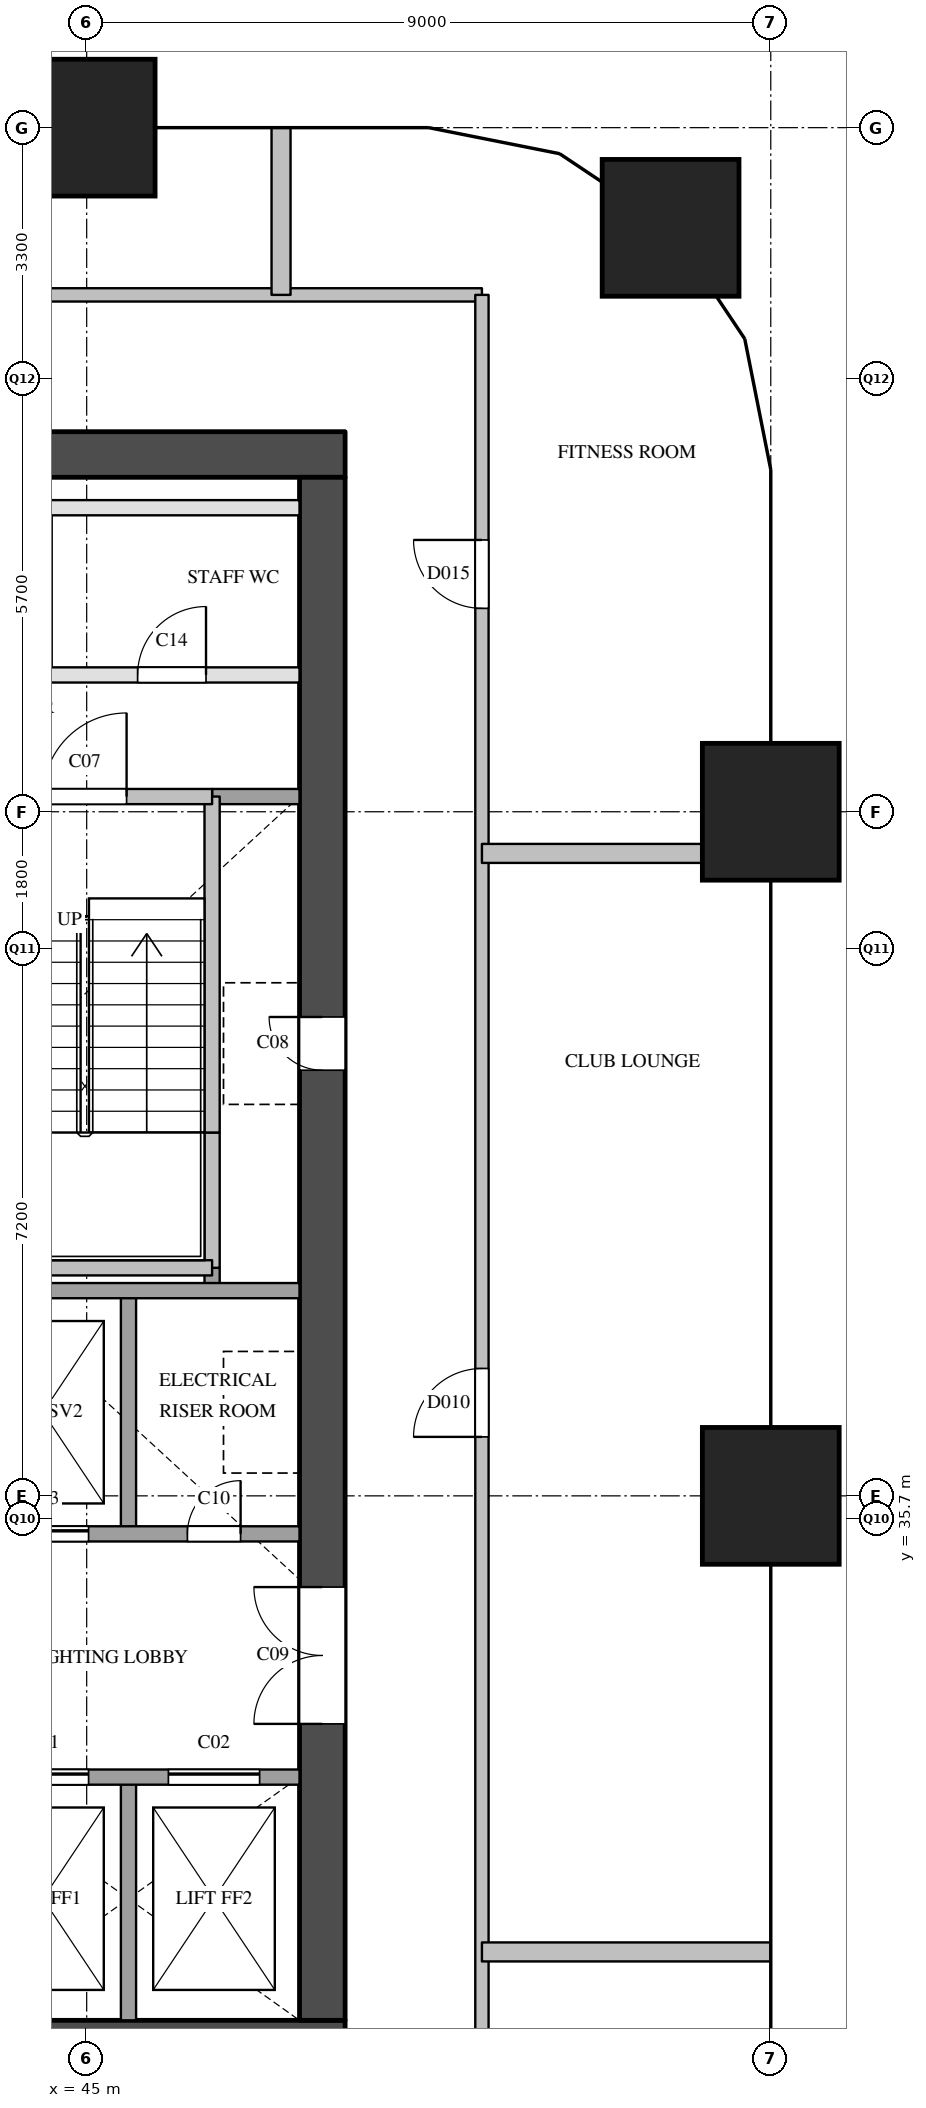
"""IFC4 building model, lengths in metres.
Left out: names, types, materials, properties, quantities, classifications, styles, units other than length and angle.
Written with IfcOpenShell. Run it as: python <this file> out.ifc"""

import sys

from ifc_helpers import new_model, si_unit, direction, frame, frame_2d, origin, origin_2d, place, context, subcontext, project, spatial, rectangle, extrude, element, fill, save


model = new_model("IFC4")
c1 = context("Model", 3, precision=1e-05, world=origin(), true_north=direction((0.0, 1.0)))
c2 = subcontext(c1, "Body", "Model", "MODEL_VIEW")
j1 = project(units=[si_unit("LENGTHUNIT", "METRE"), si_unit("PLANEANGLEUNIT", "RADIAN")], contexts=[c1])
p1 = place(None, origin())
s1 = spatial("IfcSite", under=j1, at=p1, CompositionType="ELEMENT")
p2 = place(p1, origin())
s2 = spatial("IfcBuilding", under=s1, at=p2, CompositionType="ELEMENT")
p3 = place(p2, frame((0.0, 0.0, 77.8)))
s3 = spatial("IfcBuildingStorey", under=s2, at=p3, CompositionType="ELEMENT", Elevation=77.8)
for number, where, z_axis, x_axis in (
    (1, (45.0, 54.0, 0.0), (0.0, 0.0, 1.0), (1.0, 0.0, 0.0)),
    (2, (54.0, 36.0, 0.0), (0.0, 0.0, 1.0), (1.0, 0.0, 0.0)),
    (3, (54.0, 45.0, 0.0), (0.0, 0.0, 1.0), (1.0, 0.0, 0.0)),
    (4, (52.682, 52.682, 0.0), (0.0, 0.0, 1.0), (1.0, 0.0, 0.0)),
):
    element("IfcColumn", number, at=place(p3, frame(where, z_axis=z_axis, x_axis=x_axis)), inside=s3, PredefinedType="COLUMN", context=c2, shape_type="SweptSolid", body=[
        extrude(rectangle(XDim=1.8, YDim=1.8, at=origin_2d()), origin(), (0.0, 0.0, 1.0), 3.8),
    ])
for number, where, z_axis, x_axis in (
    (5, (36.0, 28.8, 0.0), (0.0, 0.0, 1.0), (1.0, 0.0, 0.0)),
    (6, (36.0, 49.7, 0.0), (0.0, 0.0, 1.0), (1.0, 0.0, 0.0)),
):
    element("IfcWall", number, at=place(p3, frame(where, z_axis=z_axis, x_axis=x_axis)), inside=s3, PredefinedType="SHEAR", context=c2, shape_type="SweptSolid", body=[
        extrude(rectangle(XDim=12.4, YDim=0.6, at=frame_2d((6.2, 0.0))), origin(), (0.0, 0.0, 1.0), 3.5),
    ])
p4 = place(p3, frame((48.1, 29.1, 0.0), z_axis=(0.0, 0.0, 1.0), x_axis=(0.0, 1.0, 0.0)))
e7 = element("IfcWall", 7, at=p4, inside=s3, PredefinedType="SHEAR", context=c2, shape_type="SweptSolid", body=[
    extrude(rectangle(XDim=20.3, YDim=0.6, at=frame_2d((10.15, 0.0))), origin(), (0.0, 0.0, 1.0), 3.5),
])
p5 = place(p4, frame((12.5, 0.0, 0.0)))
e8 = element("IfcOpeningElement", 8, at=p5, cuts=e7, PredefinedType="OPENING", context=c2, shape_type="SweptSolid", body=[
    extrude(rectangle(XDim=0.7, YDim=2.1, at=frame_2d((0.35, 1.05))), frame((0.0, 0.31, 0.0), z_axis=(0.0, -1.0, 0.0), x_axis=(1.0, 0.0, 0.0)), (0.0, 0.0, 1.0), 0.62),
])
p6 = place(p4, frame((3.9, 0.0, 0.0)))
e9 = element("IfcOpeningElement", 9, at=p6, cuts=e7, PredefinedType="OPENING", context=c2, shape_type="SweptSolid", body=[
    extrude(rectangle(XDim=1.8, YDim=2.1, at=frame_2d((0.9, 1.05))), frame((0.0, 0.31, 0.0), z_axis=(0.0, -1.0, 0.0), x_axis=(1.0, 0.0, 0.0)), (0.0, 0.0, 1.0), 0.62),
])
for number, where, z_axis, x_axis in (
    (10, (45.55, 29.1, 0.0), (0.0, 0.0, 1.0), (0.0, 1.0, 0.0)),
    (11, (45.55, 35.5, 0.0), (0.0, 0.0, 1.0), (0.0, 1.0, 0.0)),
):
    element("IfcWall", number, at=place(p3, frame(where, z_axis=z_axis, x_axis=x_axis)), inside=s3, PredefinedType="SOLIDWALL", context=c2, shape_type="SweptSolid", body=[
        extrude(rectangle(XDim=3.2, YDim=0.2, at=frame_2d((1.6, 0.0))), origin(), (0.0, 0.0, 1.0), 3.5),
    ])
p7 = place(p3, frame((46.65, 38.7, 0.0), z_axis=(0.0, 0.0, 1.0), x_axis=(0.0, 1.0, 0.0)))
e12 = element("IfcWall", 12, at=p7, inside=s3, PredefinedType="SOLIDWALL", context=c2, shape_type="SweptSolid", body=[
    extrude(rectangle(XDim=0.3, YDim=0.2, at=frame_2d((0.15, 0.0))), origin(), (0.0, 0.0, 1.0), 3.5),
])
p8 = place(p3, frame((46.65, 39.0, 0.0), z_axis=(0.0, 0.0, 1.0), x_axis=(0.0, 1.0, 0.0)))
e13 = element("IfcWall", 13, at=p8, inside=s3, PredefinedType="SOLIDWALL", context=c2, shape_type="SweptSolid", body=[
    extrude(rectangle(XDim=1.78, YDim=0.2, at=frame_2d((0.89, 0.0))), origin(), (0.0, 0.0, 1.0), 3.5),
])
p9 = place(p3, frame((46.65, 40.78, 0.0), z_axis=(0.0, 0.0, 1.0), x_axis=(0.0, 1.0, 0.0)))
e14 = element("IfcWall", 14, at=p9, inside=s3, PredefinedType="SOLIDWALL", context=c2, shape_type="SweptSolid", body=[
    extrude(rectangle(XDim=4.42, YDim=0.2, at=frame_2d((2.21, 0.0))), origin(), (0.0, 0.0, 1.0), 3.5),
])
p10 = place(p3, frame((36.6, 32.3, 0.0), z_axis=(0.0, 0.0, 1.0), x_axis=(1.0, 0.0, 0.0)))
e15 = element("IfcWall", 15, at=p10, inside=s3, PredefinedType="SOLIDWALL", context=c2, shape_type="SweptSolid", body=[
    extrude(rectangle(XDim=11.2, YDim=0.2, at=frame_2d((5.6, 0.0))), origin(), (0.0, 0.0, 1.0), 3.5),
])
p11 = place(p10, frame((7.225, 0.0, 0.0)))
e16 = element("IfcOpeningElement", 16, at=p11, cuts=e15, PredefinedType="OPENING", context=c2, shape_type="SweptSolid", body=[
    extrude(rectangle(XDim=1.2, YDim=2.1, at=frame_2d((0.6, 1.05))), frame((0.0, 0.11, 0.0), z_axis=(0.0, -1.0, 0.0), x_axis=(1.0, 0.0, 0.0)), (0.0, 0.0, 1.0), 0.22),
])
p12 = place(p10, frame((9.475, 0.0, 0.0)))
e17 = element("IfcOpeningElement", 17, at=p12, cuts=e15, PredefinedType="OPENING", context=c2, shape_type="SweptSolid", body=[
    extrude(rectangle(XDim=1.2, YDim=2.1, at=frame_2d((0.6, 1.05))), frame((0.0, 0.11, 0.0), z_axis=(0.0, -1.0, 0.0), x_axis=(1.0, 0.0, 0.0)), (0.0, 0.0, 1.0), 0.22),
])
p13 = place(p3, frame((43.3, 35.5, 0.0), z_axis=(0.0, 0.0, 1.0), x_axis=(1.0, 0.0, 0.0)))
e18 = element("IfcWall", 18, at=p13, inside=s3, PredefinedType="SOLIDWALL", context=c2, shape_type="SweptSolid", body=[
    extrude(rectangle(XDim=4.5, YDim=0.2, at=frame_2d((2.25, 0.0))), origin(), (0.0, 0.0, 1.0), 3.5),
])
p14 = place(p13, frame((0.525, 0.0, 0.0)))
e19 = element("IfcOpeningElement", 19, at=p14, cuts=e18, PredefinedType="OPENING", context=c2, shape_type="SweptSolid", body=[
    extrude(rectangle(XDim=1.2, YDim=2.1, at=frame_2d((0.6, 1.05))), frame((0.0, 0.11, 0.0), z_axis=(0.0, -1.0, 0.0), x_axis=(1.0, 0.0, 0.0)), (0.0, 0.0, 1.0), 0.22),
])
p15 = place(p13, frame((3.025, 0.0, 0.0)))
e20 = element("IfcOpeningElement", 20, at=p15, cuts=e18, PredefinedType="OPENING", context=c2, shape_type="SweptSolid", body=[
    extrude(rectangle(XDim=0.7, YDim=2.1, at=frame_2d((0.35, 1.05))), frame((0.0, 0.11, 0.0), z_axis=(0.0, -1.0, 0.0), x_axis=(1.0, 0.0, 0.0)), (0.0, 0.0, 1.0), 0.22),
])
p16 = place(p3, frame((43.3, 38.7, 0.0), z_axis=(0.0, 0.0, 1.0), x_axis=(1.0, 0.0, 0.0)))
e21 = element("IfcWall", 21, at=p16, inside=s3, PredefinedType="SOLIDWALL", context=c2, shape_type="SweptSolid", body=[
    extrude(rectangle(XDim=4.5, YDim=0.2, at=frame_2d((2.25, 0.0))), origin(), (0.0, 0.0, 1.0), 3.5),
])
p17 = place(p3, frame((43.4, 39.0, 0.0), z_axis=(0.0, 0.0, 1.0), x_axis=(1.0, 0.0, 0.0)))
e22 = element("IfcWall", 22, at=p17, inside=s3, PredefinedType="SOLIDWALL", context=c2, shape_type="SweptSolid", body=[
    extrude(rectangle(XDim=3.25, YDim=0.2, at=frame_2d((1.625, 0.0))), origin(), (0.0, 0.0, 1.0), 3.5),
])
p18 = place(p3, frame((46.65, 45.2, 0.0), z_axis=(0.0, 0.0, 1.0), x_axis=(1.0, 0.0, 0.0)))
e23 = element("IfcWall", 23, at=p18, inside=s3, PredefinedType="SOLIDWALL", context=c2, shape_type="SweptSolid", body=[
    extrude(rectangle(XDim=1.15, YDim=0.2, at=frame_2d((0.575, 0.0))), origin(), (0.0, 0.0, 1.0), 3.5),
])
p19 = place(p3, frame((36.6, 45.2, 0.0), z_axis=(0.0, 0.0, 1.0), x_axis=(1.0, 0.0, 0.0)))
e24 = element("IfcWall", 24, at=p19, inside=s3, PredefinedType="SOLIDWALL", context=c2, shape_type="SweptSolid", body=[
    extrude(rectangle(XDim=10.05, YDim=0.2, at=frame_2d((5.025, 0.0))), origin(), (0.0, 0.0, 1.0), 3.5),
])
p20 = place(p19, frame((1.125, 0.0, 0.0)))
e25 = element("IfcOpeningElement", 25, at=p20, cuts=e24, PredefinedType="OPENING", context=c2, shape_type="SweptSolid", body=[
    extrude(rectangle(XDim=1.1, YDim=2.1, at=frame_2d((0.55, 1.05))), frame((0.0, 0.11, 0.0), z_axis=(0.0, -1.0, 0.0), x_axis=(1.0, 0.0, 0.0)), (0.0, 0.0, 1.0), 0.22),
])
p21 = place(p19, frame((4.475, 0.0, 0.0)))
e26 = element("IfcOpeningElement", 26, at=p21, cuts=e24, PredefinedType="OPENING", context=c2, shape_type="SweptSolid", body=[
    extrude(rectangle(XDim=1.1, YDim=2.1, at=frame_2d((0.55, 1.05))), frame((0.0, 0.11, 0.0), z_axis=(0.0, -1.0, 0.0), x_axis=(1.0, 0.0, 0.0)), (0.0, 0.0, 1.0), 0.22),
])
p22 = place(p19, frame((7.825, 0.0, 0.0)))
e27 = element("IfcOpeningElement", 27, at=p22, cuts=e24, PredefinedType="OPENING", context=c2, shape_type="SweptSolid", body=[
    extrude(rectangle(XDim=1.1, YDim=2.1, at=frame_2d((0.55, 1.05))), frame((0.0, 0.11, 0.0), z_axis=(0.0, -1.0, 0.0), x_axis=(1.0, 0.0, 0.0)), (0.0, 0.0, 1.0), 0.22),
])
p23 = place(p3, frame((36.6, 46.8, 0.0), z_axis=(0.0, 0.0, 1.0), x_axis=(1.0, 0.0, 0.0)))
e28 = element("IfcWall", 28, at=p23, inside=s3, PredefinedType="PARTITIONING", context=c2, shape_type="SweptSolid", body=[
    extrude(rectangle(XDim=11.2, YDim=0.2, at=frame_2d((5.6, 0.0))), origin(), (0.0, 0.0, 1.0), 3.5),
])
p24 = place(p23, frame((0.67, 0.0, 0.0)))
e29 = element("IfcOpeningElement", 29, at=p24, cuts=e28, PredefinedType="OPENING", context=c2, shape_type="SweptSolid", body=[
    extrude(rectangle(XDim=0.9, YDim=2.1, at=frame_2d((0.45, 1.05))), frame((0.0, 0.11, 0.0), z_axis=(0.0, -1.0, 0.0), x_axis=(1.0, 0.0, 0.0)), (0.0, 0.0, 1.0), 0.22),
])
p25 = place(p23, frame((4.59, 0.0, 0.0)))
e30 = element("IfcOpeningElement", 30, at=p25, cuts=e28, PredefinedType="OPENING", context=c2, shape_type="SweptSolid", body=[
    extrude(rectangle(XDim=0.9, YDim=2.1, at=frame_2d((0.45, 1.05))), frame((0.0, 0.11, 0.0), z_axis=(0.0, -1.0, 0.0), x_axis=(1.0, 0.0, 0.0)), (0.0, 0.0, 1.0), 0.22),
])
p26 = place(p23, frame((9.07, 0.0, 0.0)))
e31 = element("IfcOpeningElement", 31, at=p26, cuts=e28, PredefinedType="OPENING", context=c2, shape_type="SweptSolid", body=[
    extrude(rectangle(XDim=0.9, YDim=2.1, at=frame_2d((0.45, 1.05))), frame((0.0, 0.11, 0.0), z_axis=(0.0, -1.0, 0.0), x_axis=(1.0, 0.0, 0.0)), (0.0, 0.0, 1.0), 0.22),
])
p27 = place(p3, frame((36.6, 49.0, 0.0), z_axis=(0.0, 0.0, 1.0), x_axis=(1.0, 0.0, 0.0)))
e32 = element("IfcWall", 32, at=p27, inside=s3, PredefinedType="PARTITIONING", context=c2, shape_type="SweptSolid", body=[
    extrude(rectangle(XDim=11.2, YDim=0.2, at=frame_2d((5.6, 0.0))), origin(), (0.0, 0.0, 1.0), 3.5),
])
p28 = place(p3, frame((34.2, 51.8, 0.0), z_axis=(0.0, 0.0, 1.0), x_axis=(1.0, 0.0, 0.0)))
e33 = element("IfcWall", 33, at=p28, inside=s3, PredefinedType="PARTITIONING", context=c2, shape_type="SweptSolid", body=[
    extrude(rectangle(XDim=16.0, YDim=0.175, at=frame_2d((8.0, 0.0))), origin(), (0.0, 0.0, 1.0), 3.5),
])
p29 = place(p28, frame((7.129, 0.0, 0.0)))
e34 = element("IfcOpeningElement", 34, at=p29, cuts=e33, PredefinedType="OPENING", context=c2, shape_type="SweptSolid", body=[
    extrude(rectangle(XDim=0.9, YDim=2.1, at=frame_2d((0.45, 1.05))), frame((0.0, 0.097, 0.0), z_axis=(0.0, -1.0, 0.0), x_axis=(1.0, 0.0, 0.0)), (0.0, 0.0, 1.0), 0.195),
])
p30 = place(p3, frame((50.2, 26.7, 0.0), z_axis=(0.0, 0.0, 1.0), x_axis=(0.0, 1.0, 0.0)))
e35 = element("IfcWall", 35, at=p30, inside=s3, PredefinedType="PARTITIONING", context=c2, shape_type="SweptSolid", body=[
    extrude(rectangle(XDim=25.1, YDim=0.175, at=frame_2d((12.55, 0.0))), origin(), (0.0, 0.0, 1.0), 2.5),
])
p31 = place(p30, frame((10.076, 0.0, 0.0)))
e36 = element("IfcOpeningElement", 36, at=p31, cuts=e35, PredefinedType="OPENING", context=c2, shape_type="SweptSolid", body=[
    extrude(rectangle(XDim=0.9, YDim=2.1, at=frame_2d((0.45, 1.05))), frame((0.0, 0.097, 0.0), z_axis=(0.0, -1.0, 0.0), x_axis=(1.0, 0.0, 0.0)), (0.0, 0.0, 1.0), 0.195),
])
p32 = place(p30, frame((20.976, 0.0, 0.0)))
e37 = element("IfcOpeningElement", 37, at=p32, cuts=e35, PredefinedType="OPENING", context=c2, shape_type="SweptSolid", body=[
    extrude(rectangle(XDim=0.9, YDim=2.1, at=frame_2d((0.45, 1.05))), frame((0.0, 0.097, 0.0), z_axis=(0.0, -1.0, 0.0), x_axis=(1.0, 0.0, 0.0)), (0.0, 0.0, 1.0), 0.195),
])
p33 = place(p3, frame((50.2, 30.0, 0.0), z_axis=(0.0, 0.0, 1.0), x_axis=(1.0, 0.0, 0.0)))
e38 = element("IfcWall", 38, at=p33, inside=s3, PredefinedType="PARTITIONING", context=c2, shape_type="SweptSolid", body=[
    extrude(rectangle(XDim=3.8, YDim=0.25, at=frame_2d((1.9, 0.0))), origin(), (0.0, 0.0, 1.0), 2.5),
])
p34 = place(p3, frame((50.2, 44.452, 0.0), z_axis=(0.0, 0.0, 1.0), x_axis=(1.0, 0.0, 0.0)))
e39 = element("IfcWall", 39, at=p34, inside=s3, PredefinedType="PARTITIONING", context=c2, shape_type="SweptSolid", body=[
    extrude(rectangle(XDim=3.8, YDim=0.25, at=frame_2d((1.9, 0.0))), origin(), (0.0, 0.0, 1.0), 3.5),
])
p35 = place(p3, frame((47.557, 51.8, 0.0), z_axis=(0.0, 0.0, 1.0), x_axis=(0.0, 1.0, 0.0)))
e40 = element("IfcWall", 40, at=p35, inside=s3, PredefinedType="PARTITIONING", context=c2, shape_type="SweptSolid", body=[
    extrude(rectangle(XDim=2.2, YDim=0.25, at=frame_2d((1.1, 0.0))), origin(), (0.0, 0.0, 1.0), 2.5),
])
p36 = place(p11, origin())
e41 = element("IfcDoor", 41, at=p36, inside=s3, OperationType="SLIDING_TO_LEFT", PredefinedType="DOOR", context=c2, shape_type="SweptSolid", body=[
    extrude(rectangle(XDim=1.2, YDim=2.1, at=frame_2d((0.6, 1.05))), frame((0.0, 0.025, 0.0), z_axis=(0.0, -1.0, 0.0), x_axis=(1.0, 0.0, 0.0)), (0.0, 0.0, 1.0), 0.05),
])
fill(e16, e41)
p37 = place(p12, origin())
e42 = element("IfcDoor", 42, at=p37, inside=s3, OperationType="SLIDING_TO_LEFT", PredefinedType="DOOR", context=c2, shape_type="SweptSolid", body=[
    extrude(rectangle(XDim=1.2, YDim=2.1, at=frame_2d((0.6, 1.05))), frame((0.0, 0.025, 0.0), z_axis=(0.0, -1.0, 0.0), x_axis=(1.0, 0.0, 0.0)), (0.0, 0.0, 1.0), 0.05),
])
fill(e17, e42)
p38 = place(p14, origin())
e43 = element("IfcDoor", 43, at=p38, inside=s3, OperationType="SLIDING_TO_LEFT", PredefinedType="DOOR", context=c2, shape_type="SweptSolid", body=[
    extrude(rectangle(XDim=1.2, YDim=2.1, at=frame_2d((0.6, 1.05))), frame((0.0, 0.025, 0.0), z_axis=(0.0, -1.0, 0.0), x_axis=(1.0, 0.0, 0.0)), (0.0, 0.0, 1.0), 0.05),
])
fill(e19, e43)
p39 = place(p22, origin())
e44 = element("IfcDoor", 44, at=p39, inside=s3, OperationType="SINGLE_SWING_RIGHT", PredefinedType="DOOR", context=c2, shape_type="SweptSolid", body=[
    extrude(rectangle(XDim=1.1, YDim=2.1, at=frame_2d((0.55, 1.05))), frame((0.0, 0.025, 0.0), z_axis=(0.0, -1.0, 0.0), x_axis=(1.0, 0.0, 0.0)), (0.0, 0.0, 1.0), 0.05),
])
fill(e27, e44)
p40 = place(p5, origin())
e45 = element("IfcDoor", 45, at=p40, inside=s3, OperationType="SINGLE_SWING_RIGHT", PredefinedType="DOOR", context=c2, shape_type="SweptSolid", body=[
    extrude(rectangle(XDim=0.7, YDim=2.1, at=frame_2d((0.35, 1.05))), frame((0.0, 0.025, 0.0), z_axis=(0.0, -1.0, 0.0), x_axis=(1.0, 0.0, 0.0)), (0.0, 0.0, 1.0), 0.05),
])
fill(e8, e45)
p41 = place(p6, origin())
e46 = element("IfcDoor", 46, at=p41, inside=s3, OperationType="DOUBLE_DOOR_SINGLE_SWING", PredefinedType="DOOR", context=c2, shape_type="SweptSolid", body=[
    extrude(rectangle(XDim=1.8, YDim=2.1, at=frame_2d((0.9, 1.05))), frame((0.0, 0.025, 0.0), z_axis=(0.0, -1.0, 0.0), x_axis=(1.0, 0.0, 0.0)), (0.0, 0.0, 1.0), 0.05),
])
fill(e9, e46)
p42 = place(p15, origin())
e47 = element("IfcDoor", 47, at=p42, inside=s3, OperationType="SINGLE_SWING_RIGHT", PredefinedType="DOOR", context=c2, shape_type="SweptSolid", body=[
    extrude(rectangle(XDim=0.7, YDim=2.1, at=frame_2d((0.35, 1.05))), frame((0.0, 0.025, 0.0), z_axis=(0.0, -1.0, 0.0), x_axis=(1.0, 0.0, 0.0)), (0.0, 0.0, 1.0), 0.05),
])
fill(e20, e47)
p43 = place(p26, origin())
e48 = element("IfcDoor", 48, at=p43, inside=s3, OperationType="SINGLE_SWING_RIGHT", PredefinedType="DOOR", context=c2, shape_type="SweptSolid", body=[
    extrude(rectangle(XDim=0.9, YDim=2.1, at=frame_2d((0.45, 1.05))), frame((0.0, 0.025, 0.0), z_axis=(0.0, -1.0, 0.0), x_axis=(1.0, 0.0, 0.0)), (0.0, 0.0, 1.0), 0.05),
])
fill(e31, e48)
p44 = place(p31, origin())
e49 = element("IfcDoor", 49, at=p44, inside=s3, OperationType="SINGLE_SWING_LEFT", PredefinedType="DOOR", context=c2, shape_type="SweptSolid", body=[
    extrude(rectangle(XDim=0.9, YDim=2.1, at=frame_2d((0.45, 1.05))), frame((0.0, 0.025, 0.0), z_axis=(0.0, -1.0, 0.0), x_axis=(1.0, 0.0, 0.0)), (0.0, 0.0, 1.0), 0.05),
])
fill(e36, e49)
p45 = place(p32, origin())
e50 = element("IfcDoor", 50, at=p45, inside=s3, OperationType="SINGLE_SWING_RIGHT", PredefinedType="DOOR", context=c2, shape_type="SweptSolid", body=[
    extrude(rectangle(XDim=0.9, YDim=2.1, at=frame_2d((0.45, 1.05))), frame((0.0, 0.025, 0.0), z_axis=(0.0, -1.0, 0.0), x_axis=(1.0, 0.0, 0.0)), (0.0, 0.0, 1.0), 0.05),
])
fill(e37, e50)
save(model, sys.argv[1])
